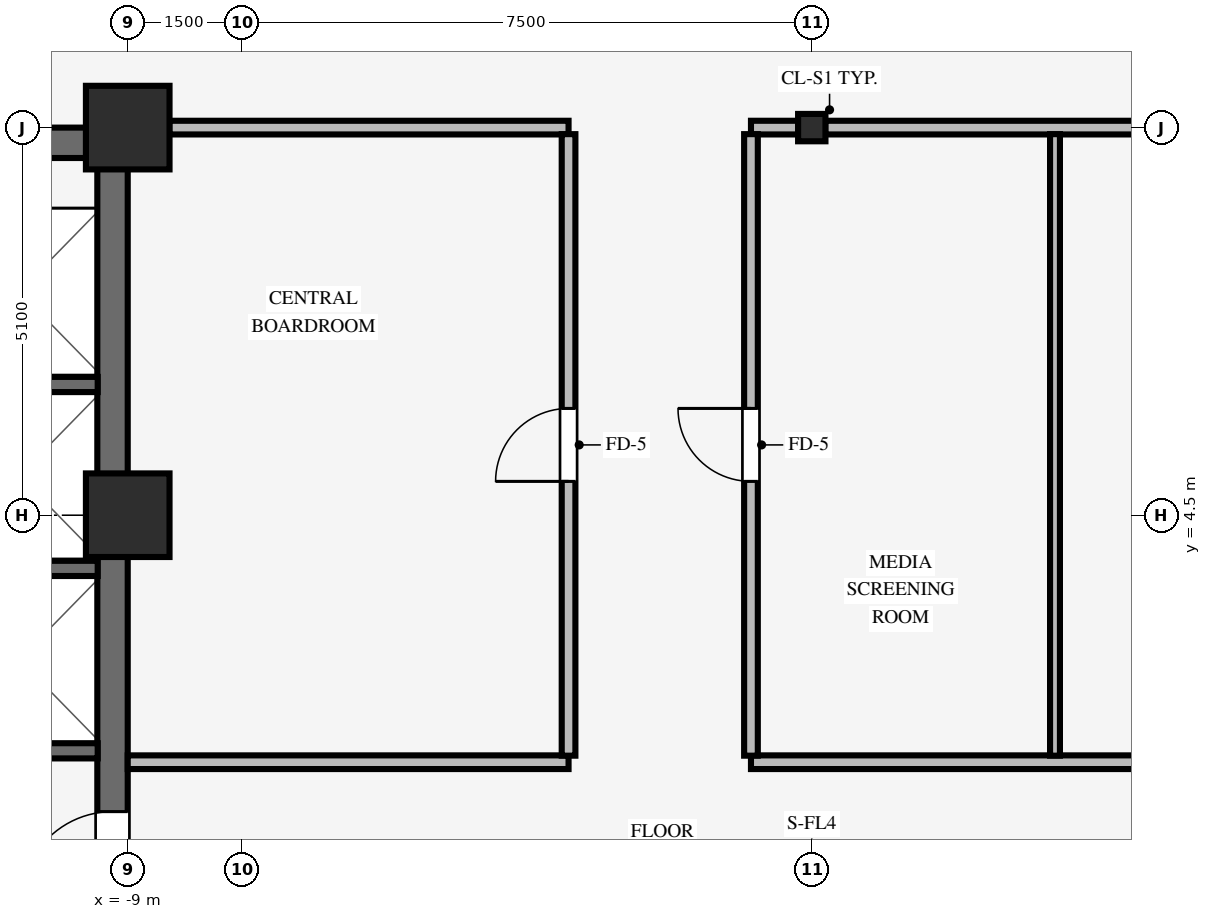
"""IFC4 building model, lengths in metres.
Left out: names, types, materials, properties, quantities, classifications, styles, units other than length and angle.
Written with IfcOpenShell. Run it as: python <this file> out.ifc"""

import sys

from ifc_helpers import new_model, si_unit, direction, frame, frame_2d, origin, origin_2d, place, context, subcontext, project, spatial, rectangle, i_section, extrude, source, transform, mapped, element, fill, save


model = new_model("IFC4")
c1 = context("Model", 3, precision=1e-05, world=origin(), true_north=direction((0.0, 1.0)))
c2 = subcontext(c1, "Body", "Model", "MODEL_VIEW")
j1 = project(units=[si_unit("LENGTHUNIT", "METRE"), si_unit("PLANEANGLEUNIT", "RADIAN")], contexts=[c1])
p1 = place(None, origin())
s1 = spatial("IfcSite", under=j1, at=p1, CompositionType="ELEMENT")
p2 = place(p1, origin())
s2 = spatial("IfcBuilding", under=s1, at=p2, CompositionType="ELEMENT")
p3 = place(p2, frame((0.0, 0.0, 109.25)))
s3 = spatial("IfcBuildingStorey", under=s2, at=p3, CompositionType="ELEMENT", Elevation=109.25)
p4 = place(p3, frame((-17.5, 9.4, 0.0), z_axis=(0.0, 0.0, 1.0), x_axis=(1.0, 0.0, 0.0)))
e1 = element("IfcWall", 1, at=p4, inside=s3, PredefinedType="SHEAR", context=c2, shape_type="SweptSolid", body=[
    extrude(rectangle(XDim=8.5, YDim=0.4, at=frame_2d((4.25, 0.0))), origin(), (0.0, 0.0, 1.0), 3.37),
])
p5 = place(p3, frame((-9.2, -9.205, 0.0), z_axis=(0.0, 0.0, 1.0), x_axis=(0.0, 1.0, 0.0)))
e2 = element("IfcWall", 2, at=p5, inside=s3, PredefinedType="SHEAR", context=c2, shape_type="SweptSolid", body=[
    extrude(rectangle(XDim=18.41, YDim=0.4, at=frame_2d((9.205, 0.0))), origin(), (0.0, 0.0, 1.0), 3.37),
])
p6 = place(p5, frame((8.605, 0.0, 0.0)))
e3 = element("IfcOpeningElement", 3, at=p6, cuts=e2, PredefinedType="OPENING", context=c2, shape_type="SweptSolid", body=[
    extrude(rectangle(XDim=1.2, YDim=2.15, at=frame_2d((0.6, 1.075))), frame((0.0, 0.21, 0.0), z_axis=(0.0, -1.0, 0.0), x_axis=(1.0, 0.0, 0.0)), (0.0, 0.0, 1.0), 0.42),
])
for number, where, z_axis, x_axis in (
    (4, (-9.0, 4.5, 0.0), (0.0, 0.0, 1.0), (1.0, 0.0, 0.0)),
    (5, (-9.0, 9.6, 0.0), (0.0, 0.0, 1.0), (1.0, 0.0, 0.0)),
):
    element("IfcColumn", number, at=place(p3, frame(where, z_axis=z_axis, x_axis=x_axis)), inside=s3, PredefinedType="COLUMN", context=c2, shape_type="SweptSolid", body=[
        extrude(rectangle(XDim=1.1, YDim=1.1, at=origin_2d()), origin(), (0.0, 0.0, 1.0), 3.37),
    ])
p7 = place(p3, frame((0.0, 9.6, 0.0), z_axis=(0.0, 0.0, 1.0), x_axis=(1.0, 0.0, 0.0)))
e6 = element("IfcColumn", 6, at=p7, inside=s3, PredefinedType="COLUMN", context=c2, shape_type="SweptSolid", body=[
    extrude(i_section(OverallWidth=0.36, OverallDepth=0.36, WebThickness=0.021, FlangeThickness=0.021, FilletRadius=0.018, at=origin_2d()), origin(), (0.0, 0.0, 1.0), 3.37),
])
for number, where, z_axis, x_axis in (
    (7, (-11.505, 1.4, 0.0), (0.0, 0.0, 1.0), (1.0, 0.0, 0.0)),
    (8, (-11.505, 3.8, 0.0), (0.0, 0.0, 1.0), (1.0, 0.0, 0.0)),
    (9, (-11.505, 6.22, 0.0), (0.0, 0.0, 1.0), (1.0, 0.0, 0.0)),
):
    element("IfcWall", number, at=place(p3, frame(where, z_axis=z_axis, x_axis=x_axis)), inside=s3, PredefinedType="SHEAR", context=c2, shape_type="SweptSolid", body=[
        extrude(rectangle(XDim=2.11, YDim=0.2, at=frame_2d((1.055, 0.0))), origin(), (0.0, 0.0, 1.0), 3.37),
    ])
p8 = place(p3, frame((-9.0, 1.25, 0.0), z_axis=(0.0, 0.0, 1.0), x_axis=(1.0, 0.0, 0.0)))
e10 = element("IfcWall", 10, at=p8, inside=s3, PredefinedType="PARTITIONING", context=c2, shape_type="SweptSolid", body=[
    extrude(rectangle(XDim=5.8, YDim=0.18, at=frame_2d((2.9, 0.0))), origin(), (0.0, 0.0, 1.0), 3.36),
])
p9 = place(p3, frame((-0.8, 1.25, 0.0), z_axis=(0.0, 0.0, 1.0), x_axis=(1.0, 0.0, 0.0)))
e11 = element("IfcWall", 11, at=p9, inside=s3, PredefinedType="PARTITIONING", context=c2, shape_type="SweptSolid", body=[
    extrude(rectangle(XDim=9.8, YDim=0.18, at=frame_2d((4.9, 0.0))), origin(), (0.0, 0.0, 1.0), 3.36),
])
p10 = place(p9, frame((6.42, 0.0, 0.0)))
e12 = element("IfcOpeningElement", 12, at=p10, cuts=e11, PredefinedType="OPENING", context=c2, shape_type="SweptSolid", body=[
    extrude(rectangle(XDim=0.96, YDim=2.1, at=frame_2d((0.48, 1.05))), frame((0.0, 0.1, 0.0), z_axis=(0.0, -1.0, 0.0), x_axis=(1.0, 0.0, 0.0)), (0.0, 0.0, 1.0), 0.2),
])
p11 = place(p3, frame((-8.454, 9.6, 0.0), z_axis=(0.0, 0.0, 1.0), x_axis=(1.0, 0.0, 0.0)))
e13 = element("IfcWall", 13, at=p11, inside=s3, PredefinedType="PARTITIONING", context=c2, shape_type="SweptSolid", body=[
    extrude(rectangle(XDim=5.254, YDim=0.18, at=frame_2d((2.627, 0.0))), origin(), (0.0, 0.0, 1.0), 2.405),
])
p12 = place(p3, frame((-0.8, 9.6, 0.0), z_axis=(0.0, 0.0, 1.0), x_axis=(1.0, 0.0, 0.0)))
e14 = element("IfcWall", 14, at=p12, inside=s3, PredefinedType="PARTITIONING", context=c2, shape_type="SweptSolid", body=[
    extrude(rectangle(XDim=0.624, YDim=0.18, at=frame_2d((0.312, 0.0))), origin(), (0.0, 0.0, 1.0), 2.405),
])
p13 = place(p3, frame((0.176, 9.6, 0.0), z_axis=(0.0, 0.0, 1.0), x_axis=(1.0, 0.0, 0.0)))
e15 = element("IfcWall", 15, at=p13, inside=s3, PredefinedType="PARTITIONING", context=c2, shape_type="SweptSolid", body=[
    extrude(rectangle(XDim=8.278, YDim=0.18, at=frame_2d((4.139, 0.0))), origin(), (0.0, 0.0, 1.0), 2.405),
])
p14 = place(p3, frame((-3.2, 1.336, 0.0), z_axis=(0.0, 0.0, 1.0), x_axis=(0.0, 1.0, 0.0)))
e16 = element("IfcWall", 16, at=p14, inside=s3, PredefinedType="PARTITIONING", context=c2, shape_type="SweptSolid", body=[
    extrude(rectangle(XDim=8.178, YDim=0.18, at=frame_2d((4.089, 0.0))), origin(), (0.0, 0.0, 1.0), 3.36),
])
p15 = place(p14, frame((3.609, 0.0, 0.0)))
e17 = element("IfcOpeningElement", 17, at=p15, cuts=e16, PredefinedType="OPENING", context=c2, shape_type="SweptSolid", body=[
    extrude(rectangle(XDim=0.96, YDim=2.1, at=frame_2d((0.48, 1.05))), frame((0.0, 0.1, 0.0), z_axis=(0.0, -1.0, 0.0), x_axis=(1.0, 0.0, 0.0)), (0.0, 0.0, 1.0), 0.2),
])
p16 = place(p3, frame((-0.8, 1.336, 0.0), z_axis=(0.0, 0.0, 1.0), x_axis=(0.0, 1.0, 0.0)))
e18 = element("IfcWall", 18, at=p16, inside=s3, PredefinedType="PARTITIONING", context=c2, shape_type="SweptSolid", body=[
    extrude(rectangle(XDim=8.178, YDim=0.18, at=frame_2d((4.089, 0.0))), origin(), (0.0, 0.0, 1.0), 3.36),
])
p17 = place(p16, frame((3.609, 0.0, 0.0)))
e19 = element("IfcOpeningElement", 19, at=p17, cuts=e18, PredefinedType="OPENING", context=c2, shape_type="SweptSolid", body=[
    extrude(rectangle(XDim=0.96, YDim=2.1, at=frame_2d((0.48, 1.05))), frame((0.0, 0.1, 0.0), z_axis=(0.0, -1.0, 0.0), x_axis=(1.0, 0.0, 0.0)), (0.0, 0.0, 1.0), 0.2),
])
p18 = place(p3, frame((3.2, 1.336, 0.0), z_axis=(0.0, 0.0, 1.0), x_axis=(0.0, 1.0, 0.0)))
e20 = element("IfcWall", 20, at=p18, inside=s3, PredefinedType="PARTITIONING", context=c2, shape_type="SweptSolid", body=[
    extrude(rectangle(XDim=8.178, YDim=0.13, at=frame_2d((4.089, 0.0))), origin(), (0.0, 0.0, 1.0), 3.36),
])
m1 = source(origin(), c2, "Body", "SweptSolid", [
    extrude(rectangle(XDim=1.2, YDim=2.15, at=frame_2d((0.6, 1.075))), frame((0.0, 0.025, 0.0), z_axis=(0.0, -1.0, 0.0), x_axis=(1.0, 0.0, 0.0)), (0.0, 0.0, 1.0), 0.05),
])
p19 = place(p6, origin())
e21 = element("IfcDoor", 21, at=p19, inside=s3, OperationType="SINGLE_SWING_LEFT", PredefinedType="DOOR", context=c2, shape_type="MappedRepresentation", body=[
    mapped(m1, transform((0.0, 0.0, 0.0), scale=1.0)),
])
fill(e3, e21)
m2 = source(origin(), c2, "Body", "SweptSolid", [
    extrude(rectangle(XDim=0.96, YDim=2.1, at=frame_2d((0.48, 1.05))), frame((0.0, 0.025, 0.0), z_axis=(0.0, -1.0, 0.0), x_axis=(1.0, 0.0, 0.0)), (0.0, 0.0, 1.0), 0.05),
])
p20 = place(p15, origin())
e22 = element("IfcDoor", 22, at=p20, inside=s3, OperationType="SINGLE_SWING_LEFT", PredefinedType="DOOR", context=c2, shape_type="MappedRepresentation", body=[
    mapped(m2, transform((0.0, 0.0, 0.0), scale=1.0)),
])
fill(e17, e22)
p21 = place(p17, origin())
e23 = element("IfcDoor", 23, at=p21, inside=s3, OperationType="SINGLE_SWING_RIGHT", PredefinedType="DOOR", context=c2, shape_type="MappedRepresentation", body=[
    mapped(m2, transform((0.0, 0.0, 0.0), scale=1.0)),
])
fill(e19, e23)
save(model, sys.argv[1])
